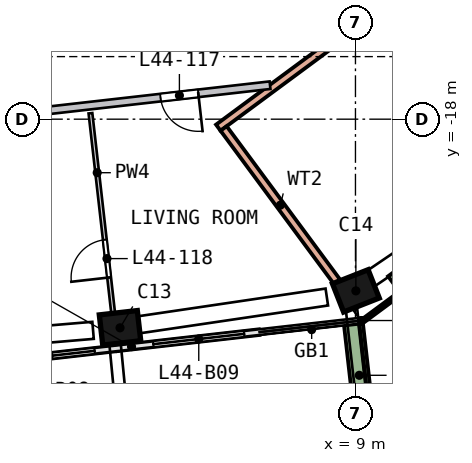
"""IFC4 building model, lengths in metres.
Left out: names, types, materials, properties, quantities, classifications, styles, units other than length and angle.
Written with IfcOpenShell. Run it as: python <this file> out.ifc"""

import sys

from ifc_helpers import new_model, si_unit, direction, frame, frame_2d, origin, origin_2d, place, context, subcontext, project, spatial, rectangle, extrude, element, fill, save


model = new_model("IFC4")
c1 = context("Model", 3, precision=1e-05, world=origin(), true_north=direction((0.0, 1.0)))
c2 = subcontext(c1, "Body", "Model", "MODEL_VIEW")
j1 = project(units=[si_unit("LENGTHUNIT", "METRE"), si_unit("PLANEANGLEUNIT", "RADIAN")], contexts=[c1])
p1 = place(None, origin())
s1 = spatial("IfcSite", under=j1, at=p1, CompositionType="ELEMENT")
p2 = place(p1, origin())
s2 = spatial("IfcBuilding", under=s1, at=p2, CompositionType="ELEMENT")
p3 = place(p2, frame((0.0, 0.0, 183.5)))
s3 = spatial("IfcBuildingStorey", under=s2, at=p3, CompositionType="ELEMENT", Elevation=183.5)
p4 = place(p3, frame((2.67, -23.507, 0.0), z_axis=(0.111714949, 0.013612645, 0.993647053), x_axis=(0.987336251, 0.111814551, -0.112537254)))
e1 = element("IfcColumn", 1, at=p4, inside=s3, PredefinedType="COLUMN", context=c2, shape_type="SweptSolid", body=[
    extrude(rectangle(XDim=1.0, YDim=0.8, at=origin_2d()), origin(), (0.0, 0.0, 1.0), 3.21),
])
p5 = place(p3, frame((8.882, -22.57, 0.0), z_axis=(0.106965234, 0.043181416, 0.993324622), x_axis=(-0.924224428, -0.364010929, 0.115348383)))
e2 = element("IfcColumn", 2, at=p5, inside=s3, PredefinedType="COLUMN", context=c2, shape_type="SweptSolid", body=[
    extrude(rectangle(XDim=1.0, YDim=0.8, at=origin_2d()), origin(), (0.0, 0.0, 1.0), 3.211),
])
p6 = place(p3, frame((-0.649, -24.413, 0.0), z_axis=(0.0, 0.0, 1.0), x_axis=(0.993608367, 0.112882298, 0.0)))
e3 = element("IfcWall", 3, at=p6, inside=s3, PredefinedType="SOLIDWALL", context=c2, shape_type="SweptSolid", body=[
    extrude(rectangle(XDim=3.4, YDim=0.15, at=frame_2d((1.7, 0.0))), origin(), (0.0, 0.0, 1.0), 2.475),
])
p7 = place(p6, frame((0.4, 0.0, 0.0)))
e4 = element("IfcOpeningElement", 4, at=p7, cuts=e3, PredefinedType="OPENING", context=c2, shape_type="SweptSolid", body=[
    extrude(rectangle(XDim=2.4, YDim=2.4, at=frame_2d((1.2, 1.2))), frame((0.0, 0.085, 0.0), z_axis=(0.0, -1.0, 0.0), x_axis=(1.0, 0.0, 0.0)), (0.0, 0.0, 1.0), 0.17),
])
p8 = place(p3, frame((2.729, -24.029, 0.0), z_axis=(0.0, 0.0, 1.0), x_axis=(0.993609226, 0.112874735, 0.0)))
e5 = element("IfcWall", 5, at=p8, inside=s3, PredefinedType="SOLIDWALL", context=c2, shape_type="SweptSolid", body=[
    extrude(rectangle(XDim=3.761, YDim=0.15, at=frame_2d((1.881, 0.0))), origin(), (0.0, 0.0, 1.0), 2.475),
])
p9 = place(p8, frame((0.961, 0.0, 0.0)))
e6 = element("IfcOpeningElement", 6, at=p9, cuts=e5, PredefinedType="OPENING", context=c2, shape_type="SweptSolid", body=[
    extrude(rectangle(XDim=2.4, YDim=2.4, at=frame_2d((1.2, 1.2))), frame((0.0, 0.085, 0.0), z_axis=(0.0, -1.0, 0.0), x_axis=(1.0, 0.0, 0.0)), (0.0, 0.0, 1.0), 0.17),
])
p10 = place(p3, frame((9.252, -26.081, 0.0), z_axis=(0.0, 0.0, 1.0), x_axis=(-0.112794004, 0.993618394, 0.0)))
e7 = element("IfcWall", 7, at=p10, inside=s3, PredefinedType="SOLIDWALL", context=c2, shape_type="SweptSolid", body=[
    extrude(rectangle(XDim=2.699, YDim=0.5, at=frame_2d((1.35, 0.0))), origin(), (0.0, 0.0, 1.0), 0.7),
])
p11 = place(p3, frame((15.844, -10.495, 0.0), z_axis=(0.0, 0.0, 1.0), x_axis=(-0.804058258, -0.594550517, 0.0)))
e8 = element("IfcWall", 8, at=p11, inside=s3, PredefinedType="SOLIDWALL", context=c2, shape_type="SweptSolid", body=[
    extrude(rectangle(XDim=13.0, YDim=0.2, at=frame_2d((6.5, 0.0))), origin(), (0.0, 0.0, 1.0), 3.19),
])
p12 = place(p11, frame((5.6, 0.0, 0.0)))
e9 = element("IfcOpeningElement", 9, at=p12, cuts=e8, PredefinedType="OPENING", context=c2, shape_type="SweptSolid", body=[
    extrude(rectangle(XDim=1.8, YDim=2.4, at=frame_2d((0.9, 1.2))), frame((0.0, 0.11, 0.0), z_axis=(0.0, -1.0, 0.0), x_axis=(1.0, 0.0, 0.0)), (0.0, 0.0, 1.0), 0.22),
])
p13 = place(p3, frame((8.516, -22.282, 0.0), z_axis=(0.0, 0.0, 1.0), x_axis=(-0.594540077, 0.804065978, 0.0)))
e10 = element("IfcWall", 10, at=p13, inside=s3, PredefinedType="SOLIDWALL", context=c2, shape_type="SweptSolid", body=[
    extrude(rectangle(XDim=5.021, YDim=0.2, at=frame_2d((2.51, 0.0))), origin(), (0.0, 0.0, 1.0), 3.19),
])
p14 = place(p3, frame((9.231, -23.282, 0.0), z_axis=(0.0, 0.0, 1.0), x_axis=(0.804070226, 0.594534332, 0.0)))
e11 = element("IfcWall", 11, at=p14, inside=s3, PredefinedType="SOLIDWALL", context=c2, shape_type="SweptSolid", body=[
    extrude(rectangle(XDim=12.84, YDim=0.1, at=frame_2d((6.42, 0.0))), origin(), (0.0, 0.0, 1.0), 0.7),
])
p15 = place(p3, frame((10.007, -22.335, 0.0), z_axis=(0.0, 0.0, 1.0), x_axis=(0.804073174, 0.594530345, 0.0)))
e12 = element("IfcWall", 12, at=p15, inside=s3, PredefinedType="SOLIDWALL", context=c2, shape_type="SweptSolid", body=[
    extrude(rectangle(XDim=4.633, YDim=0.5, at=frame_2d((2.316, 0.0))), origin(), (0.0, 0.0, 1.0), 0.7),
])
p16 = place(p3, frame((6.752, -17.106, 0.0), z_axis=(0.0, 0.0, 1.0), x_axis=(-0.993614252, -0.112830482, 0.0)))
e13 = element("IfcWall", 13, at=p16, inside=s3, PredefinedType="SOLIDWALL", context=c2, shape_type="SweptSolid", body=[
    extrude(rectangle(XDim=9.337, YDim=0.2, at=frame_2d((4.668, 0.0))), origin(), (0.0, 0.0, 1.0), 3.19),
])
p17 = place(p16, frame((1.9, 0.0, 0.0)))
e14 = element("IfcOpeningElement", 14, at=p17, cuts=e13, PredefinedType="OPENING", context=c2, shape_type="SweptSolid", body=[
    extrude(rectangle(XDim=1.0, YDim=2.1, at=frame_2d((0.5, 1.05))), frame((0.0, 0.11, 0.0), z_axis=(0.0, -1.0, 0.0), x_axis=(1.0, 0.0, 0.0)), (0.0, 0.0, 1.0), 0.22),
])
p18 = place(p3, frame((2.721, -23.954, 0.0), z_axis=(0.0, 0.0, 1.0), x_axis=(-0.112858027, 0.993611124, 0.0)))
e15 = element("IfcWall", 15, at=p18, inside=s3, PredefinedType="PARTITIONING", context=c2, shape_type="SweptSolid", body=[
    extrude(rectangle(XDim=6.15, YDim=0.1, at=frame_2d((3.075, 0.0))), origin(), (0.0, 0.0, 1.0), 3.19),
])
p19 = place(p18, frame((1.8, 0.0, 0.0)))
e16 = element("IfcOpeningElement", 16, at=p19, cuts=e15, PredefinedType="OPENING", context=c2, shape_type="SweptSolid", body=[
    extrude(rectangle(XDim=1.0, YDim=2.1, at=frame_2d((0.5, 1.05))), frame((0.0, 0.06, 0.0), z_axis=(0.0, -1.0, 0.0), x_axis=(1.0, 0.0, 0.0)), (0.0, 0.0, 1.0), 0.12),
])
p20 = place(p7, origin())
e17 = element("IfcDoor", 17, at=p20, inside=s3, OperationType="SLIDING_TO_RIGHT", PredefinedType="DOOR", context=c2, shape_type="SweptSolid", body=[
    extrude(rectangle(XDim=2.4, YDim=2.4, at=frame_2d((1.2, 1.2))), frame((0.0, 0.025, 0.0), z_axis=(0.0, -1.0, 0.0), x_axis=(1.0, 0.0, 0.0)), (0.0, 0.0, 1.0), 0.05),
])
fill(e4, e17)
p21 = place(p9, origin())
e18 = element("IfcDoor", 18, at=p21, inside=s3, OperationType="SLIDING_TO_LEFT", PredefinedType="DOOR", context=c2, shape_type="SweptSolid", body=[
    extrude(rectangle(XDim=2.4, YDim=2.4, at=frame_2d((1.2, 1.2))), frame((0.0, 0.025, 0.0), z_axis=(0.0, -1.0, 0.0), x_axis=(1.0, 0.0, 0.0)), (0.0, 0.0, 1.0), 0.05),
])
fill(e6, e18)
p22 = place(p17, origin())
e19 = element("IfcDoor", 19, at=p22, inside=s3, OperationType="SINGLE_SWING_LEFT", PredefinedType="DOOR", context=c2, shape_type="SweptSolid", body=[
    extrude(rectangle(XDim=1.0, YDim=2.1, at=frame_2d((0.5, 1.05))), frame((0.0, 0.025, 0.0), z_axis=(0.0, -1.0, 0.0), x_axis=(1.0, 0.0, 0.0)), (0.0, 0.0, 1.0), 0.05),
])
fill(e14, e19)
p23 = place(p19, origin())
e20 = element("IfcDoor", 20, at=p23, inside=s3, OperationType="SINGLE_SWING_LEFT", PredefinedType="DOOR", context=c2, shape_type="SweptSolid", body=[
    extrude(rectangle(XDim=1.0, YDim=2.1, at=frame_2d((0.5, 1.05))), frame((0.0, 0.025, 0.0), z_axis=(0.0, -1.0, 0.0), x_axis=(1.0, 0.0, 0.0)), (0.0, 0.0, 1.0), 0.05),
])
fill(e16, e20)
save(model, sys.argv[1])
